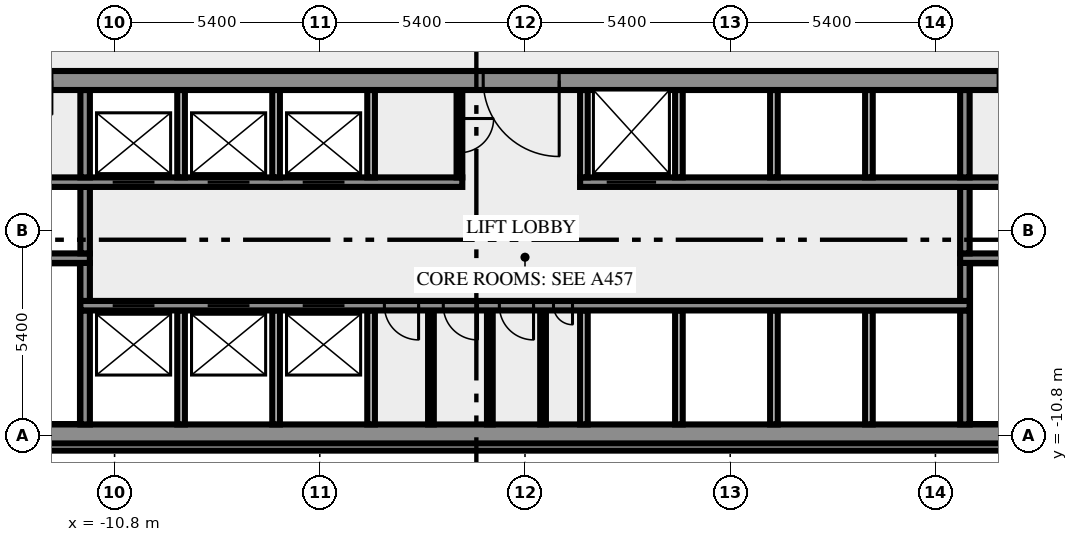
"""IFC4 building model, lengths in metres.
Left out: names, types, materials, properties, quantities, classifications, styles, units other than length and angle.
Written with IfcOpenShell. Run it as: python <this file> out.ifc"""

import sys

from ifc_helpers import new_model, si_unit, direction, frame, frame_2d, origin, place, context, subcontext, project, spatial, rectangle, extrude, element, fill, save


model = new_model("IFC4")
c1 = context("Model", 3, precision=1e-05, world=origin(), true_north=direction((0.0, 1.0)))
c2 = subcontext(c1, "Body", "Model", "MODEL_VIEW")
j1 = project(units=[si_unit("LENGTHUNIT", "METRE"), si_unit("PLANEANGLEUNIT", "RADIAN")], contexts=[c1])
p1 = place(None, origin())
s1 = spatial("IfcSite", under=j1, at=p1, CompositionType="ELEMENT")
p2 = place(p1, origin())
s2 = spatial("IfcBuilding", under=s1, at=p2, CompositionType="ELEMENT")
p3 = place(p2, frame((0.0, 0.0, 55.0)))
s3 = spatial("IfcBuildingStorey", under=s2, at=p3, CompositionType="ELEMENT", Elevation=55.0)
p4 = place(p3, frame((-17.444, -11.088, 0.0), z_axis=(0.0, 0.0, 1.0), x_axis=(1.0, 0.0, 0.0)))
e1 = element("IfcWall", 1, at=p4, inside=s3, PredefinedType="SOLIDWALL", context=c2, shape_type="SweptSolid", body=[
    extrude(rectangle(XDim=34.888, YDim=0.2, at=frame_2d((17.444, 0.0))), origin(), (0.0, 0.0, 1.0), 3.65),
])
p5 = place(p3, frame((-20.0, -10.75, 0.0), z_axis=(0.0, 0.0, 1.0), x_axis=(1.0, 0.0, 0.0)))
e2 = element("IfcWall", 2, at=p5, inside=s3, PredefinedType="SHEAR", context=c2, shape_type="SweptSolid", body=[
    extrude(rectangle(XDim=40.0, YDim=0.5, at=frame_2d((20.0, 0.0))), origin(), (0.0, 0.0, 1.0), 3.65),
])
p6 = place(p5, frame((0.8, 0.0, 1.0)))
e3 = element("IfcOpeningElement", 3, at=p6, cuts=e2, PredefinedType="OPENING", context=c2, shape_type="SweptSolid", body=[
    extrude(rectangle(XDim=1.2, YDim=1.2, at=frame_2d((0.6, 0.6))), frame((0.0, 0.26, 0.0), z_axis=(0.0, -1.0, 0.0), x_axis=(1.0, 0.0, 0.0)), (0.0, 0.0, 1.0), 0.52),
])
p7 = place(p5, frame((38.0, 0.0, 1.0)))
e4 = element("IfcOpeningElement", 4, at=p7, cuts=e2, PredefinedType="OPENING", context=c2, shape_type="SweptSolid", body=[
    extrude(rectangle(XDim=1.2, YDim=1.2, at=frame_2d((0.6, 0.6))), frame((0.0, 0.26, 0.0), z_axis=(0.0, -1.0, 0.0), x_axis=(1.0, 0.0, 0.0)), (0.0, 0.0, 1.0), 0.52),
])
p8 = place(p3, frame((-11.575, -10.5, 0.0), z_axis=(0.0, 0.0, 1.0), x_axis=(0.0, 1.0, 0.0)))
e5 = element("IfcWall", 5, at=p8, inside=s3, PredefinedType="SHEAR", context=c2, shape_type="SweptSolid", body=[
    extrude(rectangle(XDim=3.0, YDim=0.25, at=frame_2d((1.5, 0.0))), origin(), (0.0, 0.0, 1.0), 3.65),
])
for number, where, z_axis, x_axis in (
    (6, (-9.05, -10.5, 0.0), (0.0, 0.0, 1.0), (0.0, 1.0, 0.0)),
    (7, (-6.55, -10.5, 0.0), (0.0, 0.0, 1.0), (0.0, 1.0, 0.0)),
    (8, (-4.05, -10.5, 0.0), (0.0, 0.0, 1.0), (0.0, 1.0, 0.0)),
):
    element("IfcWall", number, at=place(p3, frame(where, z_axis=z_axis, x_axis=x_axis)), inside=s3, PredefinedType="SOLIDWALL", context=c2, shape_type="SweptSolid", body=[
        extrude(rectangle(XDim=3.0, YDim=0.2, at=frame_2d((1.5, 0.0))), origin(), (0.0, 0.0, 1.0), 3.65),
    ])
for number, where, z_axis, x_axis in (
    (9, (-2.475, -10.5, 0.0), (0.0, 0.0, 1.0), (0.0, 1.0, 0.0)),
    (10, (-0.925, -10.5, 0.0), (0.0, 0.0, 1.0), (0.0, 1.0, 0.0)),
    (11, (0.475, -10.5, 0.0), (0.0, 0.0, 1.0), (0.0, 1.0, 0.0)),
):
    element("IfcWall", number, at=place(p3, frame(where, z_axis=z_axis, x_axis=x_axis)), inside=s3, PredefinedType="PARTITIONING", context=c2, shape_type="SweptSolid", body=[
        extrude(rectangle(XDim=3.0, YDim=0.15, at=frame_2d((1.5, 0.0))), origin(), (0.0, 0.0, 1.0), 3.65),
    ])
for number, where, z_axis, x_axis in (
    (12, (1.55, -10.5, 0.0), (0.0, 0.0, 1.0), (0.0, 1.0, 0.0)),
    (13, (4.05, -10.5, 0.0), (0.0, 0.0, 1.0), (0.0, 1.0, 0.0)),
    (14, (6.55, -10.5, 0.0), (0.0, 0.0, 1.0), (0.0, 1.0, 0.0)),
    (15, (9.05, -10.5, 0.0), (0.0, 0.0, 1.0), (0.0, 1.0, 0.0)),
):
    element("IfcWall", number, at=place(p3, frame(where, z_axis=z_axis, x_axis=x_axis)), inside=s3, PredefinedType="SOLIDWALL", context=c2, shape_type="SweptSolid", body=[
        extrude(rectangle(XDim=3.0, YDim=0.2, at=frame_2d((1.5, 0.0))), origin(), (0.0, 0.0, 1.0), 3.65),
    ])
p9 = place(p3, frame((11.575, -10.5, 0.0), z_axis=(0.0, 0.0, 1.0), x_axis=(0.0, 1.0, 0.0)))
e16 = element("IfcWall", 16, at=p9, inside=s3, PredefinedType="SHEAR", context=c2, shape_type="SweptSolid", body=[
    extrude(rectangle(XDim=3.0, YDim=0.25, at=frame_2d((1.5, 0.0))), origin(), (0.0, 0.0, 1.0), 3.65),
])
p10 = place(p3, frame((11.7, -7.375, 0.0), z_axis=(0.0, 0.0, 1.0), x_axis=(-1.0, 0.0, 0.0)))
e17 = element("IfcWall", 17, at=p10, inside=s3, PredefinedType="SHEAR", context=c2, shape_type="SweptSolid", body=[
    extrude(rectangle(XDim=23.4, YDim=0.25, at=frame_2d((11.7, 0.0))), origin(), (0.0, 0.0, 1.0), 3.65),
])
p11 = place(p10, frame((21.45, 0.0, 0.0)))
e18 = element("IfcOpeningElement", 18, at=p11, cuts=e17, PredefinedType="OPENING", context=c2, shape_type="SweptSolid", body=[
    extrude(rectangle(XDim=1.1, YDim=2.1, at=frame_2d((0.55, 1.05))), frame((0.0, 0.135, 0.0), z_axis=(0.0, -1.0, 0.0), x_axis=(1.0, 0.0, 0.0)), (0.0, 0.0, 1.0), 0.27),
])
p12 = place(p10, frame((18.95, 0.0, 0.0)))
e19 = element("IfcOpeningElement", 19, at=p12, cuts=e17, PredefinedType="OPENING", context=c2, shape_type="SweptSolid", body=[
    extrude(rectangle(XDim=1.1, YDim=2.1, at=frame_2d((0.55, 1.05))), frame((0.0, 0.135, 0.0), z_axis=(0.0, -1.0, 0.0), x_axis=(1.0, 0.0, 0.0)), (0.0, 0.0, 1.0), 0.27),
])
p13 = place(p10, frame((16.45, 0.0, 0.0)))
e20 = element("IfcOpeningElement", 20, at=p13, cuts=e17, PredefinedType="OPENING", context=c2, shape_type="SweptSolid", body=[
    extrude(rectangle(XDim=1.1, YDim=2.1, at=frame_2d((0.55, 1.05))), frame((0.0, 0.135, 0.0), z_axis=(0.0, -1.0, 0.0), x_axis=(1.0, 0.0, 0.0)), (0.0, 0.0, 1.0), 0.27),
])
p14 = place(p10, frame((14.5, 0.0, 0.0)))
e21 = element("IfcOpeningElement", 21, at=p14, cuts=e17, PredefinedType="OPENING", context=c2, shape_type="SweptSolid", body=[
    extrude(rectangle(XDim=0.9, YDim=2.1, at=frame_2d((0.45, 1.05))), frame((0.0, 0.135, 0.0), z_axis=(0.0, -1.0, 0.0), x_axis=(1.0, 0.0, 0.0)), (0.0, 0.0, 1.0), 0.27),
])
p15 = place(p10, frame((12.95, 0.0, 0.0)))
e22 = element("IfcOpeningElement", 22, at=p15, cuts=e17, PredefinedType="OPENING", context=c2, shape_type="SweptSolid", body=[
    extrude(rectangle(XDim=0.9, YDim=2.1, at=frame_2d((0.45, 1.05))), frame((0.0, 0.135, 0.0), z_axis=(0.0, -1.0, 0.0), x_axis=(1.0, 0.0, 0.0)), (0.0, 0.0, 1.0), 0.27),
])
p16 = place(p10, frame((11.475, 0.0, 0.0)))
e23 = element("IfcOpeningElement", 23, at=p16, cuts=e17, PredefinedType="OPENING", context=c2, shape_type="SweptSolid", body=[
    extrude(rectangle(XDim=0.9, YDim=2.1, at=frame_2d((0.45, 1.05))), frame((0.0, 0.135, 0.0), z_axis=(0.0, -1.0, 0.0), x_axis=(1.0, 0.0, 0.0)), (0.0, 0.0, 1.0), 0.27),
])
p17 = place(p10, frame((10.45, 0.0, 0.0)))
e24 = element("IfcOpeningElement", 24, at=p17, cuts=e17, PredefinedType="OPENING", context=c2, shape_type="SweptSolid", body=[
    extrude(rectangle(XDim=0.5, YDim=2.1, at=frame_2d((0.25, 1.05))), frame((0.0, 0.135, 0.0), z_axis=(0.0, -1.0, 0.0), x_axis=(1.0, 0.0, 0.0)), (0.0, 0.0, 1.0), 0.27),
])
for number, where, z_axis, x_axis in (
    (25, (-11.575, -7.25, 0.0), (0.0, 0.0, 1.0), (0.0, 1.0, 0.0)),
    (26, (11.575, -7.25, 0.0), (0.0, 0.0, 1.0), (0.0, 1.0, 0.0)),
):
    element("IfcWall", number, at=place(p3, frame(where, z_axis=z_axis, x_axis=x_axis)), inside=s3, PredefinedType="SHEAR", context=c2, shape_type="SweptSolid", body=[
        extrude(rectangle(XDim=1.0, YDim=0.25, at=frame_2d((0.5, 0.0))), origin(), (0.0, 0.0, 1.0), 3.65),
    ])
p18 = place(p3, frame((-11.45, -6.125, 0.0), z_axis=(0.0, 0.0, 1.0), x_axis=(-1.0, 0.0, 0.0)))
e27 = element("IfcWall", 27, at=p18, inside=s3, PredefinedType="SHEAR", context=c2, shape_type="SweptSolid", body=[
    extrude(rectangle(XDim=8.05, YDim=0.25, at=frame_2d((4.025, 0.0))), origin(), (0.0, 0.0, 1.0), 3.65),
])
p19 = place(p18, frame((6.2, 0.0, 0.0)))
e28 = element("IfcOpeningElement", 28, at=p19, cuts=e27, PredefinedType="OPENING", context=c2, shape_type="SweptSolid", body=[
    extrude(rectangle(XDim=1.8, YDim=2.1, at=frame_2d((0.9, 1.05))), frame((0.0, 0.135, 0.0), z_axis=(0.0, -1.0, 0.0), x_axis=(1.0, 0.0, 0.0)), (0.0, 0.0, 1.0), 0.27),
])
p20 = place(p3, frame((19.5, -6.125, 0.0), z_axis=(0.0, 0.0, 1.0), x_axis=(-1.0, 0.0, 0.0)))
e29 = element("IfcWall", 29, at=p20, inside=s3, PredefinedType="SHEAR", context=c2, shape_type="SweptSolid", body=[
    extrude(rectangle(XDim=8.05, YDim=0.25, at=frame_2d((4.025, 0.0))), origin(), (0.0, 0.0, 1.0), 3.65),
])
p21 = place(p20, frame((0.05, 0.0, 0.0)))
e30 = element("IfcOpeningElement", 30, at=p21, cuts=e29, PredefinedType="OPENING", context=c2, shape_type="SweptSolid", body=[
    extrude(rectangle(XDim=1.8, YDim=2.1, at=frame_2d((0.9, 1.05))), frame((0.0, 0.135, 0.0), z_axis=(0.0, -1.0, 0.0), x_axis=(1.0, 0.0, 0.0)), (0.0, 0.0, 1.0), 0.27),
])
for number, where, z_axis, x_axis in (
    (31, (-11.575, -6.0, 0.0), (0.0, 0.0, 1.0), (0.0, 1.0, 0.0)),
    (32, (11.575, -6.0, 0.0), (0.0, 0.0, 1.0), (0.0, 1.0, 0.0)),
):
    element("IfcWall", number, at=place(p3, frame(where, z_axis=z_axis, x_axis=x_axis)), inside=s3, PredefinedType="SHEAR", context=c2, shape_type="SweptSolid", body=[
        extrude(rectangle(XDim=1.75, YDim=0.25, at=frame_2d((0.875, 0.0))), origin(), (0.0, 0.0, 1.0), 3.65),
    ])
p22 = place(p3, frame((-14.35, -4.125, 0.0), z_axis=(0.0, 0.0, 1.0), x_axis=(1.0, 0.0, 0.0)))
e33 = element("IfcWall", 33, at=p22, inside=s3, PredefinedType="SHEAR", context=c2, shape_type="SweptSolid", body=[
    extrude(rectangle(XDim=12.7, YDim=0.25, at=frame_2d((6.35, 0.0))), origin(), (0.0, 0.0, 1.0), 3.65),
])
p23 = place(p22, frame((3.5, 0.0, 0.0)))
e34 = element("IfcOpeningElement", 34, at=p23, cuts=e33, PredefinedType="OPENING", context=c2, shape_type="SweptSolid", body=[
    extrude(rectangle(XDim=1.1, YDim=2.1, at=frame_2d((0.55, 1.05))), frame((0.0, 0.135, 0.0), z_axis=(0.0, -1.0, 0.0), x_axis=(1.0, 0.0, 0.0)), (0.0, 0.0, 1.0), 0.27),
])
p24 = place(p22, frame((6.0, 0.0, 0.0)))
e35 = element("IfcOpeningElement", 35, at=p24, cuts=e33, PredefinedType="OPENING", context=c2, shape_type="SweptSolid", body=[
    extrude(rectangle(XDim=1.1, YDim=2.1, at=frame_2d((0.55, 1.05))), frame((0.0, 0.135, 0.0), z_axis=(0.0, -1.0, 0.0), x_axis=(1.0, 0.0, 0.0)), (0.0, 0.0, 1.0), 0.27),
])
p25 = place(p22, frame((8.5, 0.0, 0.0)))
e36 = element("IfcOpeningElement", 36, at=p25, cuts=e33, PredefinedType="OPENING", context=c2, shape_type="SweptSolid", body=[
    extrude(rectangle(XDim=1.1, YDim=2.1, at=frame_2d((0.55, 1.05))), frame((0.0, 0.135, 0.0), z_axis=(0.0, -1.0, 0.0), x_axis=(1.0, 0.0, 0.0)), (0.0, 0.0, 1.0), 0.27),
])
p26 = place(p3, frame((1.45, -4.125, 0.0), z_axis=(0.0, 0.0, 1.0), x_axis=(1.0, 0.0, 0.0)))
e37 = element("IfcWall", 37, at=p26, inside=s3, PredefinedType="SHEAR", context=c2, shape_type="SweptSolid", body=[
    extrude(rectangle(XDim=12.9, YDim=0.25, at=frame_2d((6.45, 0.0))), origin(), (0.0, 0.0, 1.0), 3.65),
])
p27 = place(p26, frame((0.7, 0.0, 0.0)))
e38 = element("IfcOpeningElement", 38, at=p27, cuts=e37, PredefinedType="OPENING", context=c2, shape_type="SweptSolid", body=[
    extrude(rectangle(XDim=1.3, YDim=2.1, at=frame_2d((0.65, 1.05))), frame((0.0, 0.135, 0.0), z_axis=(0.0, -1.0, 0.0), x_axis=(1.0, 0.0, 0.0)), (0.0, 0.0, 1.0), 0.27),
])
p28 = place(p3, frame((-11.575, -4.0, 0.0), z_axis=(0.0, 0.0, 1.0), x_axis=(0.0, 1.0, 0.0)))
e39 = element("IfcWall", 39, at=p28, inside=s3, PredefinedType="SHEAR", context=c2, shape_type="SweptSolid", body=[
    extrude(rectangle(XDim=2.3, YDim=0.25, at=frame_2d((1.15, 0.0))), origin(), (0.0, 0.0, 1.0), 3.65),
])
for number, where, z_axis, x_axis in (
    (40, (-9.05, -4.0, 0.0), (0.0, 0.0, 1.0), (0.0, 1.0, 0.0)),
    (41, (-6.55, -4.0, 0.0), (0.0, 0.0, 1.0), (0.0, 1.0, 0.0)),
    (42, (-4.05, -4.0, 0.0), (0.0, 0.0, 1.0), (0.0, 1.0, 0.0)),
):
    element("IfcWall", number, at=place(p3, frame(where, z_axis=z_axis, x_axis=x_axis)), inside=s3, PredefinedType="SOLIDWALL", context=c2, shape_type="SweptSolid", body=[
        extrude(rectangle(XDim=2.3, YDim=0.2, at=frame_2d((1.15, 0.0))), origin(), (0.0, 0.0, 1.0), 3.65),
    ])
p29 = place(p3, frame((-1.725, -1.7, 0.0), z_axis=(0.0, 0.0, 1.0), x_axis=(0.0, -1.0, 0.0)))
e43 = element("IfcWall", 43, at=p29, inside=s3, PredefinedType="PARTITIONING", context=c2, shape_type="SweptSolid", body=[
    extrude(rectangle(XDim=2.3, YDim=0.15, at=frame_2d((1.15, 0.0))), origin(), (0.0, 0.0, 1.0), 3.65),
])
p30 = place(p29, frame((0.75, 0.0, 0.0)))
e44 = element("IfcOpeningElement", 44, at=p30, cuts=e43, PredefinedType="OPENING", context=c2, shape_type="SweptSolid", body=[
    extrude(rectangle(XDim=0.9, YDim=2.1, at=frame_2d((0.45, 1.05))), frame((0.0, 0.085, 0.0), z_axis=(0.0, -1.0, 0.0), x_axis=(1.0, 0.0, 0.0)), (0.0, 0.0, 1.0), 0.17),
])
for number, where, z_axis, x_axis in (
    (45, (1.55, -4.0, 0.0), (0.0, 0.0, 1.0), (0.0, 1.0, 0.0)),
    (46, (4.05, -4.0, 0.0), (0.0, 0.0, 1.0), (0.0, 1.0, 0.0)),
    (47, (6.55, -4.0, 0.0), (0.0, 0.0, 1.0), (0.0, 1.0, 0.0)),
    (48, (9.05, -4.0, 0.0), (0.0, 0.0, 1.0), (0.0, 1.0, 0.0)),
):
    element("IfcWall", number, at=place(p3, frame(where, z_axis=z_axis, x_axis=x_axis)), inside=s3, PredefinedType="SOLIDWALL", context=c2, shape_type="SweptSolid", body=[
        extrude(rectangle(XDim=2.3, YDim=0.2, at=frame_2d((1.15, 0.0))), origin(), (0.0, 0.0, 1.0), 3.65),
    ])
p31 = place(p3, frame((11.575, -4.0, 0.0), z_axis=(0.0, 0.0, 1.0), x_axis=(0.0, 1.0, 0.0)))
e49 = element("IfcWall", 49, at=p31, inside=s3, PredefinedType="SHEAR", context=c2, shape_type="SweptSolid", body=[
    extrude(rectangle(XDim=2.3, YDim=0.25, at=frame_2d((1.15, 0.0))), origin(), (0.0, 0.0, 1.0), 3.65),
])
p32 = place(p3, frame((20.49, -1.45, 0.0), z_axis=(0.0, 0.0, 1.0), x_axis=(-1.0, 0.0, 0.0)))
e50 = element("IfcWall", 50, at=p32, inside=s3, PredefinedType="SHEAR", context=c2, shape_type="SweptSolid", body=[
    extrude(rectangle(XDim=40.98, YDim=0.5, at=frame_2d((20.49, 0.0))), origin(), (0.0, 0.0, 1.0), 3.65),
])
p33 = place(p32, frame((38.14, 0.0, 0.0)))
e51 = element("IfcOpeningElement", 51, at=p33, cuts=e50, PredefinedType="OPENING", context=c2, shape_type="SweptSolid", body=[
    extrude(rectangle(XDim=1.8, YDim=2.1, at=frame_2d((0.9, 1.05))), frame((0.0, 0.26, 0.0), z_axis=(0.0, -1.0, 0.0), x_axis=(1.0, 0.0, 0.0)), (0.0, 0.0, 1.0), 0.52),
])
p34 = place(p32, frame((35.89, 0.0, 0.0)))
e52 = element("IfcOpeningElement", 52, at=p34, cuts=e50, PredefinedType="OPENING", context=c2, shape_type="SweptSolid", body=[
    extrude(rectangle(XDim=0.9, YDim=2.1, at=frame_2d((0.45, 1.05))), frame((0.0, 0.26, 0.0), z_axis=(0.0, -1.0, 0.0), x_axis=(1.0, 0.0, 0.0)), (0.0, 0.0, 1.0), 0.52),
])
p35 = place(p32, frame((32.94, 0.0, 0.0)))
e53 = element("IfcOpeningElement", 53, at=p35, cuts=e50, PredefinedType="OPENING", context=c2, shape_type="SweptSolid", body=[
    extrude(rectangle(XDim=0.9, YDim=2.1, at=frame_2d((0.45, 1.05))), frame((0.0, 0.26, 0.0), z_axis=(0.0, -1.0, 0.0), x_axis=(1.0, 0.0, 0.0)), (0.0, 0.0, 1.0), 0.52),
])
p36 = place(p32, frame((19.59, 0.0, 0.0)))
e54 = element("IfcOpeningElement", 54, at=p36, cuts=e50, PredefinedType="OPENING", context=c2, shape_type="SweptSolid", body=[
    extrude(rectangle(XDim=2.0, YDim=2.1, at=frame_2d((1.0, 1.05))), frame((0.0, 0.26, 0.0), z_axis=(0.0, -1.0, 0.0), x_axis=(1.0, 0.0, 0.0)), (0.0, 0.0, 1.0), 0.52),
])
p37 = place(p32, frame((7.14, 0.0, 0.0)))
e55 = element("IfcOpeningElement", 55, at=p37, cuts=e50, PredefinedType="OPENING", context=c2, shape_type="SweptSolid", body=[
    extrude(rectangle(XDim=0.9, YDim=2.1, at=frame_2d((0.45, 1.05))), frame((0.0, 0.26, 0.0), z_axis=(0.0, -1.0, 0.0), x_axis=(1.0, 0.0, 0.0)), (0.0, 0.0, 1.0), 0.52),
])
p38 = place(p32, frame((5.028, 0.0, 0.0)))
e56 = element("IfcOpeningElement", 56, at=p38, cuts=e50, PredefinedType="OPENING", context=c2, shape_type="SweptSolid", body=[
    extrude(rectangle(XDim=0.8, YDim=2.1, at=frame_2d((0.4, 1.05))), frame((0.0, 0.26, 0.0), z_axis=(0.0, -1.0, 0.0), x_axis=(1.0, 0.0, 0.0)), (0.0, 0.0, 1.0), 0.52),
])
p39 = place(p32, frame((3.452, 0.0, 0.0)))
e57 = element("IfcOpeningElement", 57, at=p39, cuts=e50, PredefinedType="OPENING", context=c2, shape_type="SweptSolid", body=[
    extrude(rectangle(XDim=0.8, YDim=2.1, at=frame_2d((0.4, 1.05))), frame((0.0, 0.26, 0.0), z_axis=(0.0, -1.0, 0.0), x_axis=(1.0, 0.0, 0.0)), (0.0, 0.0, 1.0), 0.52),
])
p40 = place(p32, frame((1.04, 0.0, 0.0)))
e58 = element("IfcOpeningElement", 58, at=p40, cuts=e50, PredefinedType="OPENING", context=c2, shape_type="SweptSolid", body=[
    extrude(rectangle(XDim=1.8, YDim=2.1, at=frame_2d((0.9, 1.05))), frame((0.0, 0.26, 0.0), z_axis=(0.0, -1.0, 0.0), x_axis=(1.0, 0.0, 0.0)), (0.0, 0.0, 1.0), 0.52),
])
p41 = place(p11, origin())
e59 = element("IfcDoor", 59, at=p41, inside=s3, OperationType="DOUBLE_DOOR_SLIDING", PredefinedType="DOOR", context=c2, shape_type="SweptSolid", body=[
    extrude(rectangle(XDim=1.1, YDim=2.1, at=frame_2d((0.55, 1.05))), frame((0.0, 0.025, 0.0), z_axis=(0.0, -1.0, 0.0), x_axis=(1.0, 0.0, 0.0)), (0.0, 0.0, 1.0), 0.05),
])
fill(e18, e59)
p42 = place(p12, origin())
e60 = element("IfcDoor", 60, at=p42, inside=s3, OperationType="DOUBLE_DOOR_SLIDING", PredefinedType="DOOR", context=c2, shape_type="SweptSolid", body=[
    extrude(rectangle(XDim=1.1, YDim=2.1, at=frame_2d((0.55, 1.05))), frame((0.0, 0.025, 0.0), z_axis=(0.0, -1.0, 0.0), x_axis=(1.0, 0.0, 0.0)), (0.0, 0.0, 1.0), 0.05),
])
fill(e19, e60)
p43 = place(p13, origin())
e61 = element("IfcDoor", 61, at=p43, inside=s3, OperationType="DOUBLE_DOOR_SLIDING", PredefinedType="DOOR", context=c2, shape_type="SweptSolid", body=[
    extrude(rectangle(XDim=1.1, YDim=2.1, at=frame_2d((0.55, 1.05))), frame((0.0, 0.025, 0.0), z_axis=(0.0, -1.0, 0.0), x_axis=(1.0, 0.0, 0.0)), (0.0, 0.0, 1.0), 0.05),
])
fill(e20, e61)
p44 = place(p14, origin())
e62 = element("IfcDoor", 62, at=p44, inside=s3, OperationType="SINGLE_SWING_RIGHT", PredefinedType="DOOR", context=c2, shape_type="SweptSolid", body=[
    extrude(rectangle(XDim=0.9, YDim=2.1, at=frame_2d((0.45, 1.05))), frame((0.0, 0.025, 0.0), z_axis=(0.0, -1.0, 0.0), x_axis=(1.0, 0.0, 0.0)), (0.0, 0.0, 1.0), 0.05),
])
fill(e21, e62)
p45 = place(p15, origin())
e63 = element("IfcDoor", 63, at=p45, inside=s3, OperationType="SINGLE_SWING_RIGHT", PredefinedType="DOOR", context=c2, shape_type="SweptSolid", body=[
    extrude(rectangle(XDim=0.9, YDim=2.1, at=frame_2d((0.45, 1.05))), frame((0.0, 0.025, 0.0), z_axis=(0.0, -1.0, 0.0), x_axis=(1.0, 0.0, 0.0)), (0.0, 0.0, 1.0), 0.05),
])
fill(e22, e63)
p46 = place(p16, origin())
e64 = element("IfcDoor", 64, at=p46, inside=s3, OperationType="SINGLE_SWING_RIGHT", PredefinedType="DOOR", context=c2, shape_type="SweptSolid", body=[
    extrude(rectangle(XDim=0.9, YDim=2.1, at=frame_2d((0.45, 1.05))), frame((0.0, 0.025, 0.0), z_axis=(0.0, -1.0, 0.0), x_axis=(1.0, 0.0, 0.0)), (0.0, 0.0, 1.0), 0.05),
])
fill(e23, e64)
p47 = place(p17, origin())
e65 = element("IfcDoor", 65, at=p47, inside=s3, OperationType="SINGLE_SWING_LEFT", PredefinedType="DOOR", context=c2, shape_type="SweptSolid", body=[
    extrude(rectangle(XDim=0.5, YDim=2.1, at=frame_2d((0.25, 1.05))), frame((0.0, 0.025, 0.0), z_axis=(0.0, -1.0, 0.0), x_axis=(1.0, 0.0, 0.0)), (0.0, 0.0, 1.0), 0.05),
])
fill(e24, e65)
p48 = place(p23, origin())
e66 = element("IfcDoor", 66, at=p48, inside=s3, OperationType="DOUBLE_DOOR_SLIDING", PredefinedType="DOOR", context=c2, shape_type="SweptSolid", body=[
    extrude(rectangle(XDim=1.1, YDim=2.1, at=frame_2d((0.55, 1.05))), frame((0.0, 0.025, 0.0), z_axis=(0.0, -1.0, 0.0), x_axis=(1.0, 0.0, 0.0)), (0.0, 0.0, 1.0), 0.05),
])
fill(e34, e66)
p49 = place(p24, origin())
e67 = element("IfcDoor", 67, at=p49, inside=s3, OperationType="DOUBLE_DOOR_SLIDING", PredefinedType="DOOR", context=c2, shape_type="SweptSolid", body=[
    extrude(rectangle(XDim=1.1, YDim=2.1, at=frame_2d((0.55, 1.05))), frame((0.0, 0.025, 0.0), z_axis=(0.0, -1.0, 0.0), x_axis=(1.0, 0.0, 0.0)), (0.0, 0.0, 1.0), 0.05),
])
fill(e35, e67)
p50 = place(p25, origin())
e68 = element("IfcDoor", 68, at=p50, inside=s3, OperationType="DOUBLE_DOOR_SLIDING", PredefinedType="DOOR", context=c2, shape_type="SweptSolid", body=[
    extrude(rectangle(XDim=1.1, YDim=2.1, at=frame_2d((0.55, 1.05))), frame((0.0, 0.025, 0.0), z_axis=(0.0, -1.0, 0.0), x_axis=(1.0, 0.0, 0.0)), (0.0, 0.0, 1.0), 0.05),
])
fill(e36, e68)
p51 = place(p27, origin())
e69 = element("IfcDoor", 69, at=p51, inside=s3, OperationType="DOUBLE_DOOR_SLIDING", PredefinedType="DOOR", context=c2, shape_type="SweptSolid", body=[
    extrude(rectangle(XDim=1.3, YDim=2.1, at=frame_2d((0.65, 1.05))), frame((0.0, 0.025, 0.0), z_axis=(0.0, -1.0, 0.0), x_axis=(1.0, 0.0, 0.0)), (0.0, 0.0, 1.0), 0.05),
])
fill(e38, e69)
p52 = place(p30, origin())
e70 = element("IfcDoor", 70, at=p52, inside=s3, OperationType="SINGLE_SWING_RIGHT", PredefinedType="DOOR", context=c2, shape_type="SweptSolid", body=[
    extrude(rectangle(XDim=0.9, YDim=2.1, at=frame_2d((0.45, 1.05))), frame((0.0, 0.025, 0.0), z_axis=(0.0, -1.0, 0.0), x_axis=(1.0, 0.0, 0.0)), (0.0, 0.0, 1.0), 0.05),
])
fill(e44, e70)
p53 = place(p36, origin())
e71 = element("IfcDoor", 71, at=p53, inside=s3, OperationType="DOUBLE_DOOR_SINGLE_SWING", PredefinedType="DOOR", context=c2, shape_type="SweptSolid", body=[
    extrude(rectangle(XDim=2.0, YDim=2.1, at=frame_2d((1.0, 1.05))), frame((0.0, 0.025, 0.0), z_axis=(0.0, -1.0, 0.0), x_axis=(1.0, 0.0, 0.0)), (0.0, 0.0, 1.0), 0.05),
])
fill(e54, e71)
save(model, sys.argv[1])
